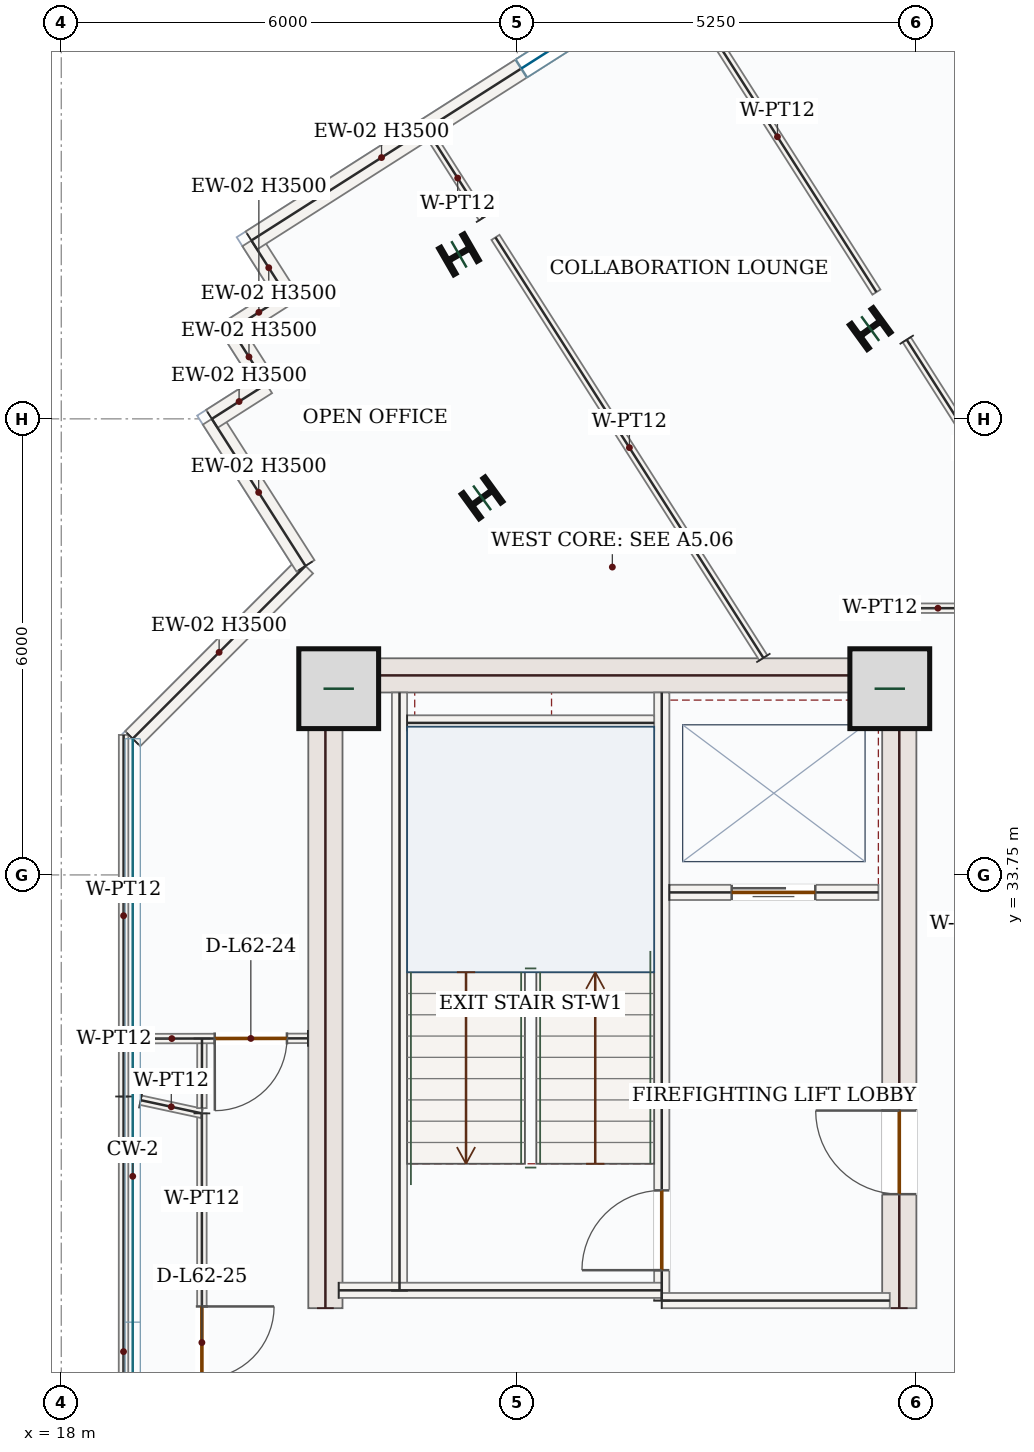
"""IFC4 building model, lengths in metres.
Left out: names, types, materials, properties, quantities, classifications, styles, units other than length and angle.
Written with IfcOpenShell. Run it as: python <this file> out.ifc"""

import sys

from ifc_helpers import new_model, si_unit, direction, frame, frame_2d, origin, origin_2d, place, context, subcontext, project, spatial, rectangle, i_section, extrude, source, transform, mapped, element, fill, save


model = new_model("IFC4")
c1 = context("Model", 3, precision=1e-05, world=origin(), true_north=direction((0.0, 1.0)))
c2 = subcontext(c1, "Body", "Model", "MODEL_VIEW")
j1 = project(units=[si_unit("LENGTHUNIT", "METRE"), si_unit("PLANEANGLEUNIT", "RADIAN")], contexts=[c1])
p1 = place(None, origin())
s1 = spatial("IfcSite", under=j1, at=p1, CompositionType="ELEMENT")
p2 = place(p1, origin())
s2 = spatial("IfcBuilding", under=s1, at=p2, CompositionType="ELEMENT")
p3 = place(p2, frame((0.0, 0.0, 261.6)))
s3 = spatial("IfcBuildingStorey", under=s2, at=p3, CompositionType="ELEMENT", Elevation=261.6)
m1 = source(origin(), c2, "Body", "SweptSolid", [
    extrude(rectangle(XDim=8.55, YDim=0.45, at=frame_2d((4.275, 0.0))), origin(), (0.0, 0.0, 1.0), 3.5),
])
p4 = place(p3, frame((21.475, 28.05, 0.0), z_axis=(0.0, 0.0, 1.0), x_axis=(0.0, 1.0, 0.0)))
e1 = element("IfcWall", 1, at=p4, inside=s3, PredefinedType="SHEAR", context=c2, shape_type="MappedRepresentation", body=[
    mapped(m1, transform((0.0, 0.0, 0.0), x_axis=(1.0, 0.0, 0.0), y_axis=(0.0, 1.0, 0.0), z_axis=(0.0, 0.0, 1.0), scale=1.0)),
])
p5 = place(p3, frame((29.025, 28.05, 0.0), z_axis=(0.0, 0.0, 1.0), x_axis=(0.0, 1.0, 0.0)))
e2 = element("IfcWall", 2, at=p5, inside=s3, PredefinedType="SHEAR", context=c2, shape_type="SweptSolid", body=[
    extrude(rectangle(XDim=8.55, YDim=0.45, at=frame_2d((4.275, 0.0))), origin(), (0.0, 0.0, 1.0), 3.5),
])
p6 = place(p5, frame((1.5, 0.0, 0.0)))
e3 = element("IfcOpeningElement", 3, at=p6, cuts=e2, PredefinedType="OPENING", context=c2, shape_type="SweptSolid", body=[
    extrude(rectangle(XDim=1.1, YDim=2.2, at=frame_2d((0.55, 1.1))), frame((0.0, 0.235, 0.0), z_axis=(0.0, -1.0, 0.0), x_axis=(1.0, 0.0, 0.0)), (0.0, 0.0, 1.0), 0.47),
])
m2 = source(origin(), c2, "Body", "SweptSolid", [
    extrude(rectangle(XDim=7.1, YDim=0.45, at=frame_2d((3.55, 0.0))), origin(), (0.0, 0.0, 1.0), 3.5),
])
p7 = place(p3, frame((21.7, 36.375, 0.0), z_axis=(0.0, 0.0, 1.0), x_axis=(1.0, 0.0, 0.0)))
e4 = element("IfcWall", 4, at=p7, inside=s3, PredefinedType="SHEAR", context=c2, shape_type="MappedRepresentation", body=[
    mapped(m2, transform((0.0, 0.0, 0.0), x_axis=(1.0, 0.0, 0.0), y_axis=(0.0, 1.0, 0.0), z_axis=(0.0, 0.0, 1.0), scale=1.0)),
])
m3 = source(origin(), c2, "Body", "SweptSolid", [
    extrude(rectangle(XDim=1.05, YDim=1.05, at=origin_2d()), origin(), (0.0, 0.0, 1.0), 3.75),
])
for number, where, z_axis, x_axis in (
    (5, (21.65, 36.2, 0.0), (0.0, 0.0, 1.0), (1.0, 0.0, 0.0)),
    (6, (28.9, 36.2, 0.0), (0.0, 0.0, 1.0), (1.0, 0.0, 0.0)),
):
    element("IfcColumn", number, at=place(p3, frame(where, z_axis=z_axis, x_axis=x_axis)), inside=s3, PredefinedType="COLUMN", context=c2, shape_type="MappedRepresentation", body=[
        mapped(m3, transform((0.0, 0.0, 0.0), x_axis=(1.0, 0.0, 0.0), y_axis=(0.0, 1.0, 0.0), z_axis=(0.0, 0.0, 1.0), scale=1.0)),
    ])
m4 = source(origin(), c2, "Body", "SweptSolid", [
    extrude(i_section(OverallWidth=0.399, OverallDepth=0.386, WebThickness=0.021, FlangeThickness=0.033, FilletRadius=0.018, at=origin_2d()), origin(), (0.0, 0.0, 1.0), 3.75),
])
for number, where, z_axis, x_axis in (
    (7, (28.643, 40.937, 0.0), (0.0, 0.0, 1.0), (-0.588, 0.809, 0.0)),
    (8, (23.536, 38.711, 0.0), (0.0, 0.0, 1.0), (-0.588, 0.809, 0.0)),
    (9, (23.232, 41.914, 0.0), (0.0, 0.0, 1.0), (-0.5, 0.866, 0.0)),
):
    element("IfcColumn", number, at=place(p3, frame(where, z_axis=z_axis, x_axis=x_axis)), inside=s3, PredefinedType="COLUMN", context=c2, shape_type="MappedRepresentation", body=[
        mapped(m4, transform((0.0, 0.0, 0.0), x_axis=(1.0, 0.0, 0.0), y_axis=(0.0, 1.0, 0.0), z_axis=(0.0, 0.0, 1.0), scale=1.0)),
    ])
m5 = source(origin(), c2, "Body", "SweptSolid", [
    extrude(rectangle(XDim=3.215, YDim=0.28, at=frame_2d((1.607, 0.0))), origin(), (0.0, 0.0, 1.0), 3.5),
])
p8 = place(p3, frame((18.94, 35.542, 0.0), z_axis=(0.0, 0.0, 1.0), x_axis=(0.707106781187, 0.707106781187, 0.0)))
e10 = element("IfcWall", 10, at=p8, inside=s3, PredefinedType="SOLIDWALL", context=c2, shape_type="MappedRepresentation", body=[
    mapped(m5, transform((0.0, 0.0, 0.0), x_axis=(1.0, 0.0, 0.0), y_axis=(0.0, 1.0, 0.0), z_axis=(0.0, 0.0, 1.0), scale=1.0)),
])
m6 = source(origin(), c2, "Body", "SweptSolid", [
    extrude(rectangle(XDim=2.293, YDim=0.28, at=frame_2d((1.147, 0.0))), origin(), (0.0, 0.0, 1.0), 3.5),
])
p9 = place(p3, frame((21.213, 37.815, 0.0), z_axis=(0.0, 0.0, 1.0), x_axis=(-0.53726116654, 0.843415934713, 0.0)))
e11 = element("IfcWall", 11, at=p9, inside=s3, PredefinedType="SOLIDWALL", context=c2, shape_type="MappedRepresentation", body=[
    mapped(m6, transform((0.0, 0.0, 0.0), x_axis=(1.0, 0.0, 0.0), y_axis=(0.0, 1.0, 0.0), z_axis=(0.0, 0.0, 1.0), scale=1.0)),
])
m7 = source(origin(), c2, "Body", "SweptSolid", [
    extrude(rectangle(XDim=0.85, YDim=0.28, at=frame_2d((0.425, 0.0))), origin(), (0.0, 0.0, 1.0), 3.5),
])
for number, where, z_axis, x_axis in (
    (12, (19.981, 39.75, 0.0), (0.0, 0.0, 1.0), (0.843, 0.537, 0.0)),
    (13, (20.698, 40.206, 0.0), (0.0, 0.0, 1.0), (-0.537, 0.843, 0.0)),
    (14, (20.241, 40.923, 0.0), (0.0, 0.0, 1.0), (0.843, 0.537, 0.0)),
    (15, (20.958, 41.38, 0.0), (0.0, 0.0, 1.0), (-0.537, 0.843, 0.0)),
):
    element("IfcWall", number, at=place(p3, frame(where, z_axis=z_axis, x_axis=x_axis)), inside=s3, PredefinedType="SOLIDWALL", context=c2, shape_type="MappedRepresentation", body=[
        mapped(m7, transform((0.0, 0.0, 0.0), x_axis=(1.0, 0.0, 0.0), y_axis=(0.0, 1.0, 0.0), z_axis=(0.0, 0.0, 1.0), scale=1.0)),
    ])
p10 = place(p3, frame((20.501, 42.097, 0.0), z_axis=(0.0, 0.0, 1.0), x_axis=(0.843388777764, 0.537303796322, 0.0)))
e16 = element("IfcWall", 16, at=p10, inside=s3, PredefinedType="SOLIDWALL", context=c2, shape_type="SweptSolid", body=[
    extrude(rectangle(XDim=9.92, YDim=0.28, at=frame_2d((4.96, 0.0))), origin(), (0.0, 0.0, 1.0), 3.5),
])
p11 = place(p10, frame((4.21, 0.0, 0.85)))
e17 = element("IfcOpeningElement", 17, at=p11, cuts=e16, PredefinedType="OPENING", context=c2, shape_type="SweptSolid", body=[
    extrude(rectangle(XDim=1.5, YDim=1.5, at=frame_2d((0.75, 0.75))), frame((0.0, 0.15, 0.0), z_axis=(0.0, -1.0, 0.0), x_axis=(1.0, 0.0, 0.0)), (0.0, 0.0, 1.0), 0.3),
])
m8 = source(origin(), c2, "Body", "SweptSolid", [
    extrude(rectangle(XDim=7.87, YDim=0.2, at=frame_2d((3.935, 0.0))), origin(), (0.0, 0.0, 1.0), 3.5),
])
p12 = place(p3, frame((22.45, 28.28, 0.0), z_axis=(0.0, 0.0, 1.0), x_axis=(0.0, 1.0, 0.0)))
e18 = element("IfcWall", 18, at=p12, inside=s3, PredefinedType="SOLIDWALL", context=c2, shape_type="MappedRepresentation", body=[
    mapped(m8, transform((0.0, 0.0, 0.0), x_axis=(1.0, 0.0, 0.0), y_axis=(0.0, 1.0, 0.0), z_axis=(0.0, 0.0, 1.0), scale=1.0)),
])
p13 = place(p3, frame((25.9, 28.15, 0.0), z_axis=(0.0, 0.0, 1.0), x_axis=(0.0, 1.0, 0.0)))
e19 = element("IfcWall", 19, at=p13, inside=s3, PredefinedType="SOLIDWALL", context=c2, shape_type="SweptSolid", body=[
    extrude(rectangle(XDim=8.0, YDim=0.2, at=frame_2d((4.0, 0.0))), origin(), (0.0, 0.0, 1.0), 3.5),
])
p14 = place(p13, frame((0.4, 0.0, 0.0)))
e20 = element("IfcOpeningElement", 20, at=p14, cuts=e19, PredefinedType="OPENING", context=c2, shape_type="SweptSolid", body=[
    extrude(rectangle(XDim=1.05, YDim=2.15, at=frame_2d((0.525, 1.075))), frame((0.0, 0.11, 0.0), z_axis=(0.0, -1.0, 0.0), x_axis=(1.0, 0.0, 0.0)), (0.0, 0.0, 1.0), 0.22),
])
m9 = source(origin(), c2, "Body", "SweptSolid", [
    extrude(rectangle(XDim=4.25, YDim=0.2, at=frame_2d((2.125, 0.0))), origin(), (0.0, 0.0, 1.0), 3.5),
])
p15 = place(p3, frame((21.65, 28.285, 0.0), z_axis=(0.0, 0.0, 1.0), x_axis=(1.0, 0.0, 0.0)))
e21 = element("IfcWall", 21, at=p15, inside=s3, PredefinedType="SOLIDWALL", context=c2, shape_type="MappedRepresentation", body=[
    mapped(m9, transform((0.0, 0.0, 0.0), x_axis=(1.0, 0.0, 0.0), y_axis=(0.0, 1.0, 0.0), z_axis=(0.0, 0.0, 1.0), scale=1.0)),
])
m10 = source(origin(), c2, "Body", "SweptSolid", [
    extrude(rectangle(XDim=3.0, YDim=0.2, at=frame_2d((1.5, 0.0))), origin(), (0.0, 0.0, 1.0), 3.5),
])
p16 = place(p3, frame((25.9, 28.15, 0.0), z_axis=(0.0, 0.0, 1.0), x_axis=(1.0, 0.0, 0.0)))
e22 = element("IfcWall", 22, at=p16, inside=s3, PredefinedType="SOLIDWALL", context=c2, shape_type="MappedRepresentation", body=[
    mapped(m10, transform((0.0, 0.0, 0.0), x_axis=(1.0, 0.0, 0.0), y_axis=(0.0, 1.0, 0.0), z_axis=(0.0, 0.0, 1.0), scale=1.0)),
])
m11 = source(origin(), c2, "Body", "SweptSolid", [
    extrude(rectangle(XDim=3.25, YDim=0.2, at=frame_2d((1.625, 0.0))), origin(), (0.0, 0.0, 1.0), 3.5),
])
p17 = place(p3, frame((22.55, 35.75, 0.0), z_axis=(0.0, 0.0, 1.0), x_axis=(1.0, 0.0, 0.0)))
e23 = element("IfcWall", 23, at=p17, inside=s3, PredefinedType="SOLIDWALL", context=c2, shape_type="MappedRepresentation", body=[
    mapped(m11, transform((0.0, 0.0, 0.0), x_axis=(1.0, 0.0, 0.0), y_axis=(0.0, 1.0, 0.0), z_axis=(0.0, 0.0, 1.0), scale=1.0)),
])
p18 = place(p3, frame((26.0, 33.52, 0.0), z_axis=(0.0, 0.0, 1.0), x_axis=(1.0, 0.0, 0.0)))
e24 = element("IfcWall", 24, at=p18, inside=s3, PredefinedType="SOLIDWALL", context=c2, shape_type="SweptSolid", body=[
    extrude(rectangle(XDim=2.75, YDim=0.2, at=frame_2d((1.375, 0.0))), origin(), (0.0, 0.0, 1.0), 3.5),
])
p19 = place(p18, frame((0.82, 0.0, 0.0)))
e25 = element("IfcOpeningElement", 25, at=p19, cuts=e24, PredefinedType="OPENING", context=c2, shape_type="SweptSolid", body=[
    extrude(rectangle(XDim=1.1, YDim=2.15, at=frame_2d((0.55, 1.075))), frame((0.0, 0.11, 0.0), z_axis=(0.0, -1.0, 0.0), x_axis=(1.0, 0.0, 0.0)), (0.0, 0.0, 1.0), 0.22),
])
m12 = source(origin(), c2, "Body", "SweptSolid", [
    extrude(rectangle(XDim=4.188, YDim=0.125, at=frame_2d((2.094, 0.0))), origin(), (0.0, 0.0, 1.0), 3.5),
])
p20 = place(p3, frame((29.123, 40.792, 0.0), z_axis=(0.0, 0.0, 1.0), x_axis=(0.537264008944, -0.843414124078, 0.0)))
e26 = element("IfcWall", 26, at=p20, inside=s3, PredefinedType="PARTITIONING", context=c2, shape_type="MappedRepresentation", body=[
    mapped(m12, transform((0.0, 0.0, 0.0), x_axis=(1.0, 0.0, 0.0), y_axis=(0.0, 1.0, 0.0), z_axis=(0.0, 0.0, 1.0), scale=1.0)),
])
p21 = place(p3, frame((31.292, 37.26, 0.0), z_axis=(0.0, 0.0, 1.0), x_axis=(-0.999999820546, -0.000599089277, 0.0)))
e27 = element("IfcWall", 27, at=p21, inside=s3, PredefinedType="PARTITIONING", context=c2, shape_type="SweptSolid", body=[
    extrude(rectangle(XDim=2.038, YDim=0.125, at=frame_2d((1.019, 0.0))), origin(), (0.0, 0.0, 1.0), 3.5),
])
p22 = place(p21, frame((0.381, 0.0, 0.0)))
e28 = element("IfcOpeningElement", 28, at=p22, cuts=e27, PredefinedType="OPENING", context=c2, shape_type="SweptSolid", body=[
    extrude(rectangle(XDim=0.95, YDim=2.15, at=frame_2d((0.475, 1.075))), frame((0.0, 0.073, 0.0), z_axis=(0.0, -1.0, 0.0), x_axis=(1.0, 0.0, 0.0)), (0.0, 0.0, 1.0), 0.145),
])
m13 = source(origin(), c2, "Body", "SweptSolid", [
    extrude(rectangle(XDim=6.56, YDim=0.125, at=frame_2d((3.28, 0.0))), origin(), (0.0, 0.0, 1.0), 3.5),
])
p23 = place(p3, frame((27.237, 36.605, 0.0), z_axis=(0.0, 0.0, 1.0), x_axis=(-0.537282422054, 0.843402394443, 0.0)))
e29 = element("IfcWall", 29, at=p23, inside=s3, PredefinedType="PARTITIONING", context=c2, shape_type="MappedRepresentation", body=[
    mapped(m13, transform((0.0, 0.0, 0.0), x_axis=(1.0, 0.0, 0.0), y_axis=(0.0, 1.0, 0.0), z_axis=(0.0, 0.0, 1.0), scale=1.0)),
])
m14 = source(origin(), c2, "Body", "SweptSolid", [
    extrude(rectangle(XDim=1.241, YDim=0.125, at=frame_2d((0.621, 0.0))), origin(), (0.0, 0.0, 1.0), 3.5),
])
p24 = place(p3, frame((23.549, 42.394, 0.0), z_axis=(0.0, 0.0, 1.0), x_axis=(-0.537244446477, 0.843426585264, 0.0)))
e30 = element("IfcWall", 30, at=p24, inside=s3, PredefinedType="PARTITIONING", context=c2, shape_type="MappedRepresentation", body=[
    mapped(m14, transform((0.0, 0.0, 0.0), x_axis=(1.0, 0.0, 0.0), y_axis=(0.0, 1.0, 0.0), z_axis=(0.0, 0.0, 1.0), scale=1.0)),
])
m15 = source(origin(), c2, "Body", "SweptSolid", [
    extrude(rectangle(XDim=4.846, YDim=0.125, at=frame_2d((2.423, 0.0))), origin(), (0.0, 0.0, 1.0), 3.5),
])
p25 = place(p3, frame((26.12, 45.505, 0.0), z_axis=(0.0, 0.0, 1.0), x_axis=(0.537305688893, -0.843387572047, 0.0)))
e31 = element("IfcWall", 31, at=p25, inside=s3, PredefinedType="PARTITIONING", context=c2, shape_type="MappedRepresentation", body=[
    mapped(m15, transform((0.0, 0.0, 0.0), x_axis=(1.0, 0.0, 0.0), y_axis=(0.0, 1.0, 0.0), z_axis=(0.0, 0.0, 1.0), scale=1.0)),
])
p26 = place(p3, frame((19.85, 30.613, 0.0), z_axis=(0.0, 0.0, 1.0), x_axis=(0.0, -1.0, 0.0)))
e32 = element("IfcWall", 32, at=p26, inside=s3, PredefinedType="PARTITIONING", context=c2, shape_type="SweptSolid", body=[
    extrude(rectangle(XDim=8.207, YDim=0.125, at=frame_2d((4.104, 0.0))), origin(), (0.0, 0.0, 1.0), 3.5),
])
p27 = place(p26, frame((2.54, 0.0, 0.0)))
e33 = element("IfcOpeningElement", 33, at=p27, cuts=e32, PredefinedType="OPENING", context=c2, shape_type="SweptSolid", body=[
    extrude(rectangle(XDim=0.95, YDim=2.15, at=frame_2d((0.475, 1.075))), frame((0.0, 0.073, 0.0), z_axis=(0.0, -1.0, 0.0), x_axis=(1.0, 0.0, 0.0)), (0.0, 0.0, 1.0), 0.145),
])
m16 = source(origin(), c2, "Body", "SweptSolid", [
    extrude(rectangle(XDim=6.713, YDim=0.125, at=frame_2d((3.356, 0.0))), origin(), (0.0, 0.0, 1.0), 3.5),
])
p28 = place(p3, frame((18.818, 24.122, 0.0), z_axis=(0.0, 0.0, 1.0), x_axis=(0.000327332225, 0.999999946427, 0.0)))
e34 = element("IfcWall", 34, at=p28, inside=s3, PredefinedType="PARTITIONING", context=c2, shape_type="MappedRepresentation", body=[
    mapped(m16, transform((0.0, 0.0, 0.0), x_axis=(1.0, 0.0, 0.0), y_axis=(0.0, 1.0, 0.0), z_axis=(0.0, 0.0, 1.0), scale=1.0)),
])
m17 = source(origin(), c2, "Body", "SweptSolid", [
    extrude(rectangle(XDim=0.824, YDim=0.125, at=frame_2d((0.412, 0.0))), origin(), (0.0, 0.0, 1.0), 3.5),
])
p29 = place(p3, frame((19.045, 30.786, 0.0), z_axis=(0.0, 0.0, 1.0), x_axis=(0.977541402347, -0.210743461816, 0.0)))
e35 = element("IfcWall", 35, at=p29, inside=s3, PredefinedType="PARTITIONING", context=c2, shape_type="MappedRepresentation", body=[
    mapped(m17, transform((0.0, 0.0, 0.0), x_axis=(1.0, 0.0, 0.0), y_axis=(0.0, 1.0, 0.0), z_axis=(0.0, 0.0, 1.0), scale=1.0)),
])
m18 = source(origin(), c2, "Body", "SweptSolid", [
    extrude(rectangle(XDim=0.916, YDim=0.125, at=frame_2d((0.458, 0.0))), origin(), (0.0, 0.0, 1.0), 3.5),
])
p30 = place(p3, frame((19.851, 31.598, 0.0), z_axis=(0.0, 0.0, 1.0), x_axis=(-0.001332976688, -0.999999111586, 0.0)))
e36 = element("IfcWall", 36, at=p30, inside=s3, PredefinedType="PARTITIONING", context=c2, shape_type="MappedRepresentation", body=[
    mapped(m18, transform((0.0, 0.0, 0.0), x_axis=(1.0, 0.0, 0.0), y_axis=(0.0, 1.0, 0.0), z_axis=(0.0, 0.0, 1.0), scale=1.0)),
])
m19 = source(origin(), c2, "Body", "SweptSolid", [
    extrude(rectangle(XDim=4.757, YDim=0.125, at=frame_2d((2.378, 0.0))), origin(), (0.0, 0.0, 1.0), 3.5),
])
p31 = place(p3, frame((18.82, 30.835, 0.0), z_axis=(0.0, 0.0, 1.0), x_axis=(0.0, 1.0, 0.0)))
e37 = element("IfcWall", 37, at=p31, inside=s3, PredefinedType="PARTITIONING", context=c2, shape_type="MappedRepresentation", body=[
    mapped(m19, transform((0.0, 0.0, 0.0), x_axis=(1.0, 0.0, 0.0), y_axis=(0.0, 1.0, 0.0), z_axis=(0.0, 0.0, 1.0), scale=1.0)),
])
p32 = place(p3, frame((21.245, 31.6, 0.0), z_axis=(0.0, 0.0, 1.0), x_axis=(-0.999998798684, -0.001550042425, 0.0)))
e38 = element("IfcWall", 38, at=p32, inside=s3, PredefinedType="PARTITIONING", context=c2, shape_type="SweptSolid", body=[
    extrude(rectangle(XDim=2.205, YDim=0.125, at=frame_2d((1.103, 0.0))), origin(), (0.0, 0.0, 1.0), 3.5),
])
p33 = place(p32, frame((0.276, 0.0, 0.0)))
e39 = element("IfcOpeningElement", 39, at=p33, cuts=e38, PredefinedType="OPENING", context=c2, shape_type="SweptSolid", body=[
    extrude(rectangle(XDim=0.95, YDim=2.15, at=frame_2d((0.475, 1.075))), frame((0.0, 0.073, 0.0), z_axis=(0.0, -1.0, 0.0), x_axis=(1.0, 0.0, 0.0)), (0.0, 0.0, 1.0), 0.145),
])
m20 = source(origin(), c2, "Body", "SweptSolid", [
    extrude(rectangle(XDim=1.5, YDim=1.5, at=frame_2d((0.75, 0.75))), frame((0.0, 0.03, 0.0), z_axis=(0.0, -1.0, 0.0), x_axis=(1.0, 0.0, 0.0)), (0.0, 0.0, 1.0), 0.06),
])
p34 = place(p11, origin())
e40 = element("IfcWindow", 40, at=p34, inside=s3, PartitioningType="SINGLE_PANEL", PredefinedType="WINDOW", context=c2, shape_type="MappedRepresentation", body=[
    mapped(m20, transform((0.0, 0.0, 0.0), x_axis=(1.0, 0.0, 0.0), y_axis=(0.0, 1.0, 0.0), z_axis=(0.0, 0.0, 1.0), scale=1.0)),
])
fill(e17, e40)
m21 = source(origin(), c2, "Body", "SweptSolid", [
    extrude(rectangle(XDim=1.05, YDim=2.15, at=frame_2d((0.525, 1.075))), frame((0.0, 0.025, 0.0), z_axis=(0.0, -1.0, 0.0), x_axis=(1.0, 0.0, 0.0)), (0.0, 0.0, 1.0), 0.05),
])
p35 = place(p14, origin())
e41 = element("IfcDoor", 41, at=p35, inside=s3, OperationType="SINGLE_SWING_LEFT", PredefinedType="DOOR", context=c2, shape_type="MappedRepresentation", body=[
    mapped(m21, transform((0.0, 0.0, 0.0), x_axis=(1.0, 0.0, 0.0), y_axis=(0.0, 1.0, 0.0), z_axis=(0.0, 0.0, 1.0), scale=1.0)),
])
fill(e20, e41)
m22 = source(origin(), c2, "Body", "SweptSolid", [
    extrude(rectangle(XDim=1.1, YDim=2.15, at=frame_2d((0.55, 1.075))), frame((0.0, 0.025, 0.0), z_axis=(0.0, -1.0, 0.0), x_axis=(1.0, 0.0, 0.0)), (0.0, 0.0, 1.0), 0.05),
])
p36 = place(p19, origin())
e42 = element("IfcDoor", 42, at=p36, inside=s3, OperationType="DOUBLE_DOOR_SLIDING", PredefinedType="DOOR", context=c2, shape_type="MappedRepresentation", body=[
    mapped(m22, transform((0.0, 0.0, 0.0), x_axis=(1.0, 0.0, 0.0), y_axis=(0.0, 1.0, 0.0), z_axis=(0.0, 0.0, 1.0), scale=1.0)),
])
fill(e25, e42)
m23 = source(origin(), c2, "Body", "SweptSolid", [
    extrude(rectangle(XDim=1.1, YDim=2.2, at=frame_2d((0.55, 1.1))), frame((0.0, 0.025, 0.0), z_axis=(0.0, -1.0, 0.0), x_axis=(1.0, 0.0, 0.0)), (0.0, 0.0, 1.0), 0.05),
])
p37 = place(p6, origin())
e43 = element("IfcDoor", 43, at=p37, inside=s3, OperationType="SINGLE_SWING_RIGHT", PredefinedType="DOOR", context=c2, shape_type="MappedRepresentation", body=[
    mapped(m23, transform((0.0, 0.0, 0.0), x_axis=(1.0, 0.0, 0.0), y_axis=(0.0, 1.0, 0.0), z_axis=(0.0, 0.0, 1.0), scale=1.0)),
])
fill(e3, e43)
m24 = source(origin(), c2, "Body", "SweptSolid", [
    extrude(rectangle(XDim=0.95, YDim=2.15, at=frame_2d((0.475, 1.075))), frame((0.0, 0.025, 0.0), z_axis=(0.0, -1.0, 0.0), x_axis=(1.0, 0.0, 0.0)), (0.0, 0.0, 1.0), 0.05),
])
p38 = place(p33, origin())
e44 = element("IfcDoor", 44, at=p38, inside=s3, OperationType="SINGLE_SWING_RIGHT", PredefinedType="DOOR", context=c2, shape_type="MappedRepresentation", body=[
    mapped(m24, transform((0.0, 0.0, 0.0), x_axis=(1.0, 0.0, 0.0), y_axis=(0.0, 1.0, 0.0), z_axis=(0.0, 0.0, 1.0), scale=1.0)),
])
fill(e39, e44)
p39 = place(p27, origin())
e45 = element("IfcDoor", 45, at=p39, inside=s3, OperationType="SINGLE_SWING_LEFT", PredefinedType="DOOR", context=c2, shape_type="MappedRepresentation", body=[
    mapped(m24, transform((0.0, 0.0, 0.0), x_axis=(1.0, 0.0, 0.0), y_axis=(0.0, 1.0, 0.0), z_axis=(0.0, 0.0, 1.0), scale=1.0)),
])
fill(e33, e45)
save(model, sys.argv[1])
